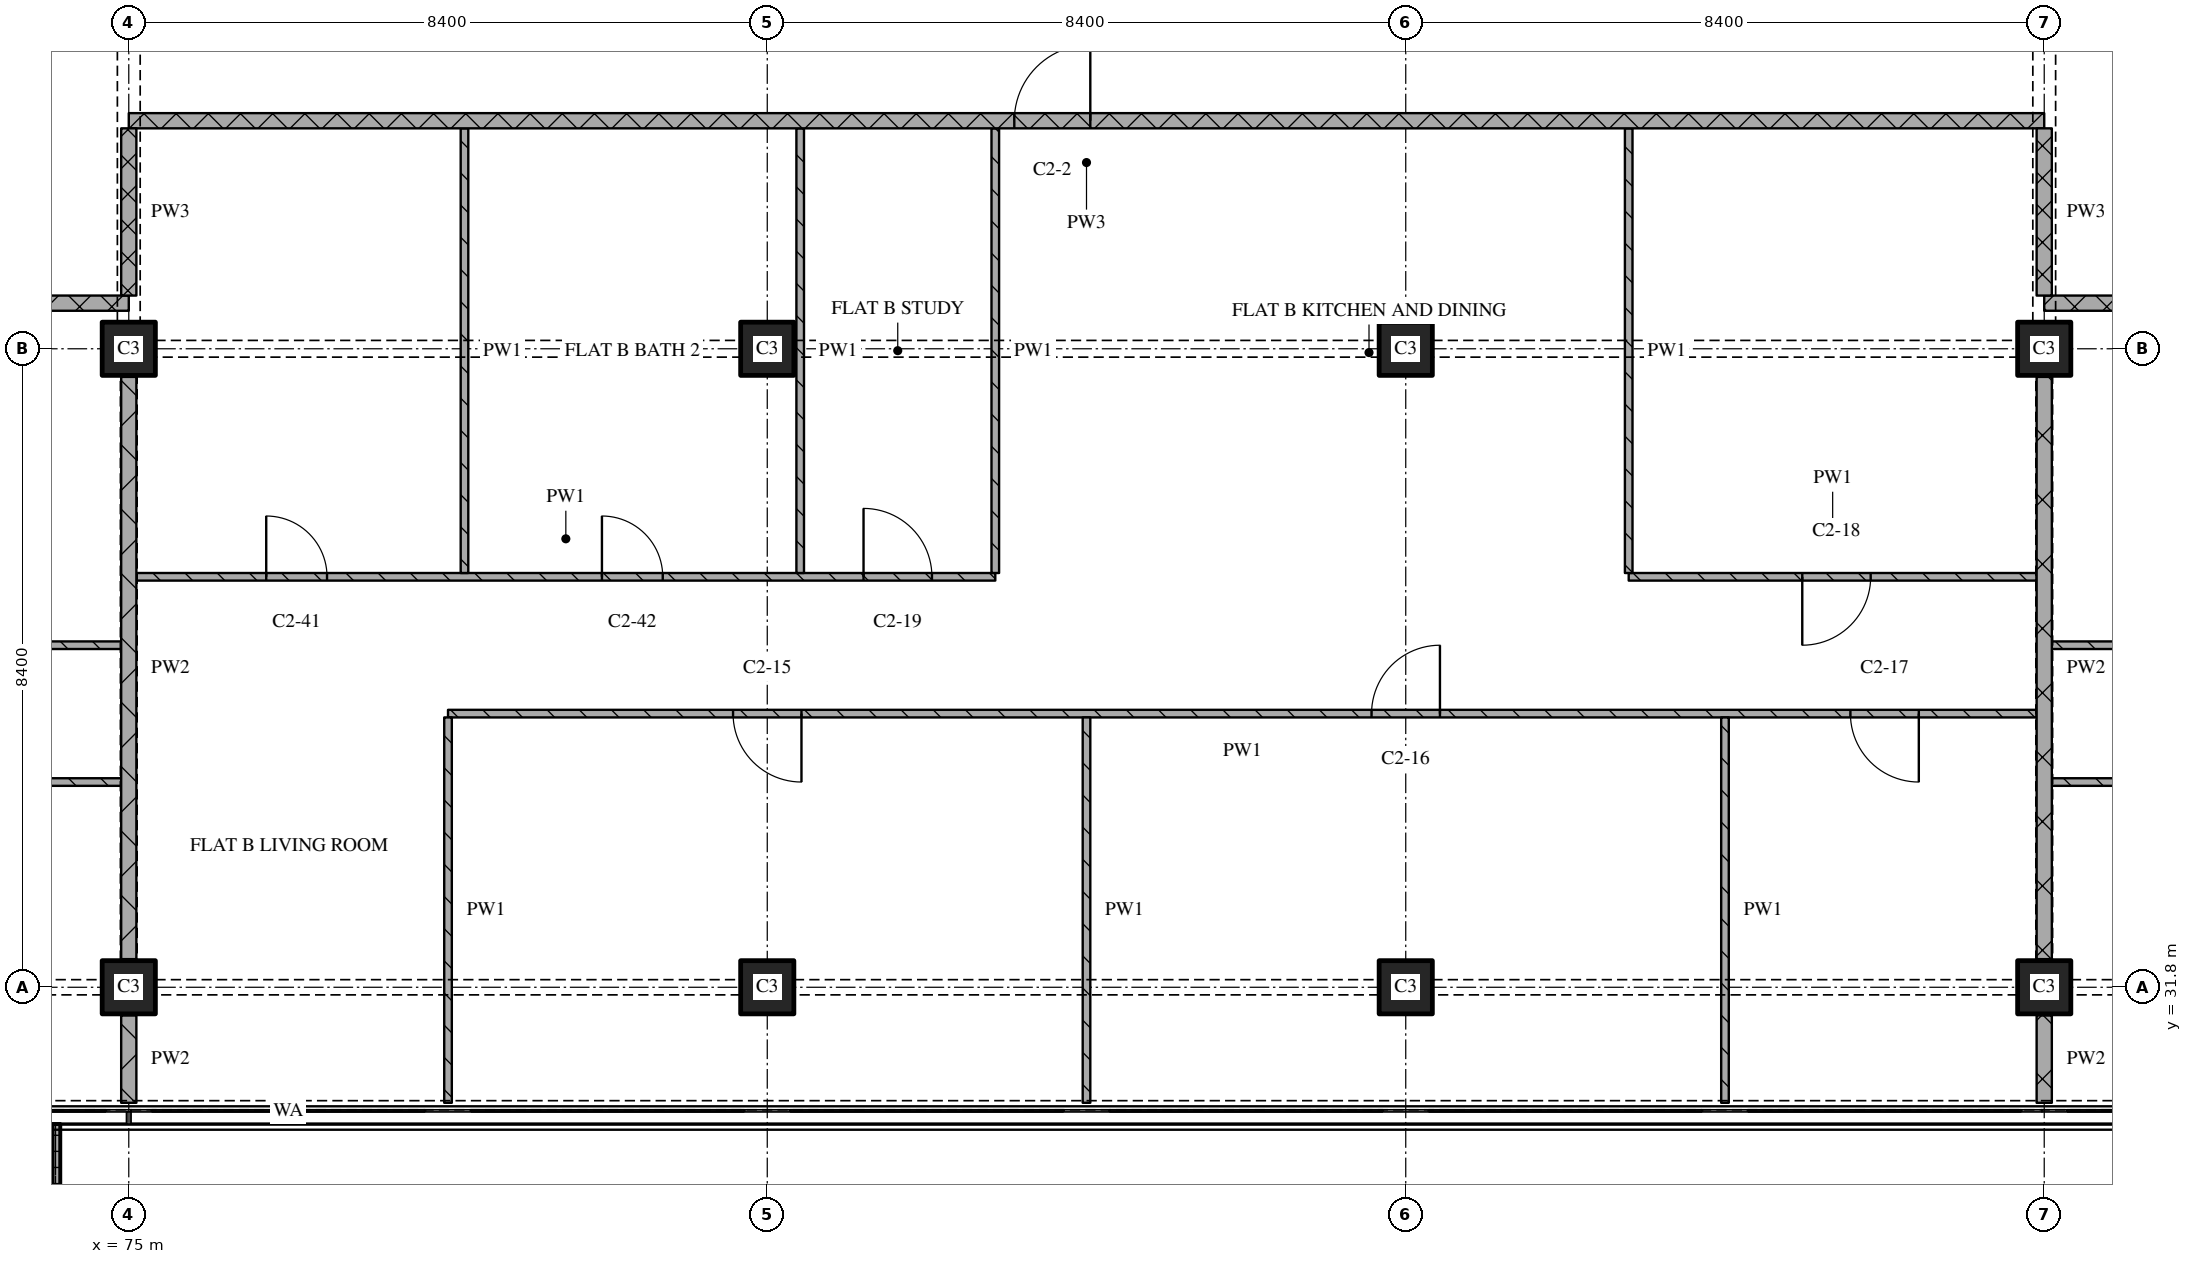
"""IFC4 building model, lengths in metres.
Left out: names, types, materials, properties, quantities, classifications, styles, units other than length and angle.
Written with IfcOpenShell. Run it as: python <this file> out.ifc"""

import sys

from ifc_helpers import new_model, si_unit, direction, frame, frame_2d, origin, origin_2d, place, context, subcontext, project, spatial, polyline, rectangle, outline, extrude, element, fill, save


model = new_model("IFC4")
c1 = context("Model", 3, precision=1e-05, world=origin(), true_north=direction((0.0, 1.0)))
c2 = subcontext(c1, "Body", "Model", "MODEL_VIEW")
j1 = project(units=[si_unit("LENGTHUNIT", "METRE"), si_unit("PLANEANGLEUNIT", "RADIAN")], contexts=[c1])
p1 = place(None, origin())
s1 = spatial("IfcSite", under=j1, at=p1, CompositionType="ELEMENT")
p2 = place(p1, origin())
s2 = spatial("IfcBuilding", under=s1, at=p2, CompositionType="ELEMENT")
p3 = place(p2, frame((0.0, 0.0, 165.45)))
s3 = spatial("IfcBuildingStorey", under=s2, at=p3, CompositionType="ELEMENT", Elevation=165.45)
for number, where, z_axis, x_axis in (
    (1, (75.0, 31.8, 0.0), (0.0, 0.0, 1.0), (1.0, 0.0, 0.0)),
    (2, (75.0, 40.2, 0.0), (0.0, 0.0, 1.0), (1.0, 0.0, 0.0)),
    (3, (83.4, 31.8, 0.0), (0.0, 0.0, 1.0), (1.0, 0.0, 0.0)),
    (4, (83.4, 40.2, 0.0), (0.0, 0.0, 1.0), (1.0, 0.0, 0.0)),
    (5, (91.8, 31.8, 0.0), (0.0, 0.0, 1.0), (1.0, 0.0, 0.0)),
    (6, (91.8, 40.2, 0.0), (0.0, 0.0, 1.0), (1.0, 0.0, 0.0)),
    (7, (100.2, 31.8, 0.0), (0.0, 0.0, 1.0), (1.0, 0.0, 0.0)),
    (8, (100.2, 40.2, 0.0), (0.0, 0.0, 1.0), (1.0, 0.0, 0.0)),
):
    element("IfcColumn", number, at=place(p3, frame(where, z_axis=z_axis, x_axis=x_axis)), inside=s3, PredefinedType="COLUMN", context=c2, shape_type="SweptSolid", body=[
        extrude(rectangle(XDim=0.7, YDim=0.7, at=origin_2d()), origin(), (0.0, 0.0, 1.0), 3.6),
    ])
p4 = place(p3, origin())
e9 = element("IfcWall", 9, at=p4, inside=s3, PredefinedType="SOLIDWALL", context=c2, shape_type="SweptSolid", body=[
    extrude(outline(polyline([(71.7, 30.0), (71.8, 30.0), (71.8, 28.5), (74.0, 28.5), (74.0, 30.0), (74.1, 30.0), (74.1, 28.4), (71.7, 28.4), (71.7, 30.0)])), origin(), (0.0, 0.0, 1.0), 1.0),
])
p5 = place(p3, frame((74.9, 34.5, 0.0), z_axis=(0.0, 0.0, 1.0), x_axis=(-1.0, 0.0, 0.0)))
e10 = element("IfcWall", 10, at=p5, inside=s3, PredefinedType="PARTITIONING", context=c2, shape_type="SweptSolid", body=[
    extrude(rectangle(XDim=16.7, YDim=0.1, at=frame_2d((8.35, 0.0))), origin(), (0.0, 0.0, 1.0), 3.32),
])
p6 = place(p5, frame((1.55, 0.0, 0.0)))
e11 = element("IfcOpeningElement", 11, at=p6, cuts=e10, PredefinedType="OPENING", context=c2, shape_type="SweptSolid", body=[
    extrude(rectangle(XDim=0.9, YDim=2.1, at=frame_2d((0.45, 1.05))), frame((0.0, 0.06, 0.0), z_axis=(0.0, -1.0, 0.0), x_axis=(1.0, 0.0, 0.0)), (0.0, 0.0, 1.0), 0.12),
])
p7 = place(p5, frame((7.85, 0.0, 0.0)))
e12 = element("IfcOpeningElement", 12, at=p7, cuts=e10, PredefinedType="OPENING", context=c2, shape_type="SweptSolid", body=[
    extrude(rectangle(XDim=0.9, YDim=2.1, at=frame_2d((0.45, 1.05))), frame((0.0, 0.06, 0.0), z_axis=(0.0, -1.0, 0.0), x_axis=(1.0, 0.0, 0.0)), (0.0, 0.0, 1.0), 0.12),
])
p8 = place(p5, frame((14.15, 0.0, 0.0)))
e13 = element("IfcOpeningElement", 13, at=p8, cuts=e10, PredefinedType="OPENING", context=c2, shape_type="SweptSolid", body=[
    extrude(rectangle(XDim=0.9, YDim=2.1, at=frame_2d((0.45, 1.05))), frame((0.0, 0.06, 0.0), z_axis=(0.0, -1.0, 0.0), x_axis=(1.0, 0.0, 0.0)), (0.0, 0.0, 1.0), 0.12),
])
p9 = place(p3, frame((117.0, 34.5, 0.0), z_axis=(0.0, 0.0, 1.0), x_axis=(-1.0, 0.0, 0.0)))
e14 = element("IfcWall", 14, at=p9, inside=s3, PredefinedType="PARTITIONING", context=c2, shape_type="SweptSolid", body=[
    extrude(rectangle(XDim=16.7, YDim=0.1, at=frame_2d((8.35, 0.0))), origin(), (0.0, 0.0, 1.0), 3.32),
])
p10 = place(p9, frame((12.15, 0.0, 0.0)))
e15 = element("IfcOpeningElement", 15, at=p10, cuts=e14, PredefinedType="OPENING", context=c2, shape_type="SweptSolid", body=[
    extrude(rectangle(XDim=0.9, YDim=2.1, at=frame_2d((0.45, 1.05))), frame((0.0, 0.06, 0.0), z_axis=(0.0, -1.0, 0.0), x_axis=(1.0, 0.0, 0.0)), (0.0, 0.0, 1.0), 0.12),
])
p11 = place(p3, frame((100.1, 35.4, 0.0), z_axis=(0.0, 0.0, 1.0), x_axis=(-1.0, 0.0, 0.0)))
e16 = element("IfcWall", 16, at=p11, inside=s3, PredefinedType="PARTITIONING", context=c2, shape_type="SweptSolid", body=[
    extrude(rectangle(XDim=20.9, YDim=0.1, at=frame_2d((10.45, 0.0))), origin(), (0.0, 0.0, 1.0), 3.32),
])
p12 = place(p11, frame((1.55, 0.0, 0.0)))
e17 = element("IfcOpeningElement", 17, at=p12, cuts=e16, PredefinedType="OPENING", context=c2, shape_type="SweptSolid", body=[
    extrude(rectangle(XDim=0.9, YDim=2.1, at=frame_2d((0.45, 1.05))), frame((0.0, 0.06, 0.0), z_axis=(0.0, -1.0, 0.0), x_axis=(1.0, 0.0, 0.0)), (0.0, 0.0, 1.0), 0.12),
])
p13 = place(p11, frame((7.85, 0.0, 0.0)))
e18 = element("IfcOpeningElement", 18, at=p13, cuts=e16, PredefinedType="OPENING", context=c2, shape_type="SweptSolid", body=[
    extrude(rectangle(XDim=0.9, YDim=2.1, at=frame_2d((0.45, 1.05))), frame((0.0, 0.06, 0.0), z_axis=(0.0, -1.0, 0.0), x_axis=(1.0, 0.0, 0.0)), (0.0, 0.0, 1.0), 0.12),
])
p14 = place(p11, frame((16.25, 0.0, 0.0)))
e19 = element("IfcOpeningElement", 19, at=p14, cuts=e16, PredefinedType="OPENING", context=c2, shape_type="SweptSolid", body=[
    extrude(rectangle(XDim=0.9, YDim=2.1, at=frame_2d((0.45, 1.05))), frame((0.0, 0.06, 0.0), z_axis=(0.0, -1.0, 0.0), x_axis=(1.0, 0.0, 0.0)), (0.0, 0.0, 1.0), 0.12),
])
p15 = place(p3, frame((66.3, 36.3, 0.0), z_axis=(0.0, 0.0, 1.0), x_axis=(1.0, 0.0, 0.0)))
e20 = element("IfcWall", 20, at=p15, inside=s3, PredefinedType="PARTITIONING", context=c2, shape_type="SweptSolid", body=[
    extrude(rectangle(XDim=8.6, YDim=0.1, at=frame_2d((4.3, 0.0))), origin(), (0.0, 0.0, 1.0), 3.32),
])
p16 = place(p15, frame((6.2, 0.0, 0.0)))
e21 = element("IfcOpeningElement", 21, at=p16, cuts=e20, PredefinedType="OPENING", context=c2, shape_type="SweptSolid", body=[
    extrude(rectangle(XDim=0.8, YDim=2.1, at=frame_2d((0.4, 1.05))), frame((0.0, 0.06, 0.0), z_axis=(0.0, -1.0, 0.0), x_axis=(1.0, 0.0, 0.0)), (0.0, 0.0, 1.0), 0.12),
])
p17 = place(p3, frame((100.3, 36.3, 0.0), z_axis=(0.0, 0.0, 1.0), x_axis=(1.0, 0.0, 0.0)))
e22 = element("IfcWall", 22, at=p17, inside=s3, PredefinedType="PARTITIONING", context=c2, shape_type="SweptSolid", body=[
    extrude(rectangle(XDim=12.2, YDim=0.1, at=frame_2d((6.1, 0.0))), origin(), (0.0, 0.0, 1.0), 3.32),
])
p18 = place(p17, frame((1.75, 0.0, 0.0)))
e23 = element("IfcOpeningElement", 23, at=p18, cuts=e22, PredefinedType="OPENING", context=c2, shape_type="SweptSolid", body=[
    extrude(rectangle(XDim=0.8, YDim=2.1, at=frame_2d((0.4, 1.05))), frame((0.0, 0.06, 0.0), z_axis=(0.0, -1.0, 0.0), x_axis=(1.0, 0.0, 0.0)), (0.0, 0.0, 1.0), 0.12),
])
p19 = place(p17, frame((6.25, 0.0, 0.0)))
e24 = element("IfcOpeningElement", 24, at=p19, cuts=e22, PredefinedType="OPENING", context=c2, shape_type="SweptSolid", body=[
    extrude(rectangle(XDim=0.8, YDim=2.1, at=frame_2d((0.4, 1.05))), frame((0.0, 0.06, 0.0), z_axis=(0.0, -1.0, 0.0), x_axis=(1.0, 0.0, 0.0)), (0.0, 0.0, 1.0), 0.12),
])
p20 = place(p3, frame((75.1, 37.2, 0.0), z_axis=(0.0, 0.0, 1.0), x_axis=(1.0, 0.0, 0.0)))
e25 = element("IfcWall", 25, at=p20, inside=s3, PredefinedType="PARTITIONING", context=c2, shape_type="SweptSolid", body=[
    extrude(rectangle(XDim=11.3, YDim=0.1, at=frame_2d((5.65, 0.0))), origin(), (0.0, 0.0, 1.0), 3.32),
])
p21 = place(p20, frame((1.708, 0.0, 0.0)))
e26 = element("IfcOpeningElement", 26, at=p21, cuts=e25, PredefinedType="OPENING", context=c2, shape_type="SweptSolid", body=[
    extrude(rectangle(XDim=0.8, YDim=2.1, at=frame_2d((0.4, 1.05))), frame((0.0, 0.06, 0.0), z_axis=(0.0, -1.0, 0.0), x_axis=(1.0, 0.0, 0.0)), (0.0, 0.0, 1.0), 0.12),
])
p22 = place(p20, frame((6.125, 0.0, 0.0)))
e27 = element("IfcOpeningElement", 27, at=p22, cuts=e25, PredefinedType="OPENING", context=c2, shape_type="SweptSolid", body=[
    extrude(rectangle(XDim=0.8, YDim=2.1, at=frame_2d((0.4, 1.05))), frame((0.0, 0.06, 0.0), z_axis=(0.0, -1.0, 0.0), x_axis=(1.0, 0.0, 0.0)), (0.0, 0.0, 1.0), 0.12),
])
p23 = place(p20, frame((9.567, 0.0, 0.0)))
e28 = element("IfcOpeningElement", 28, at=p23, cuts=e25, PredefinedType="OPENING", context=c2, shape_type="SweptSolid", body=[
    extrude(rectangle(XDim=0.9, YDim=2.1, at=frame_2d((0.45, 1.05))), frame((0.0, 0.06, 0.0), z_axis=(0.0, -1.0, 0.0), x_axis=(1.0, 0.0, 0.0)), (0.0, 0.0, 1.0), 0.12),
])
p24 = place(p3, frame((94.733, 37.2, 0.0), z_axis=(0.0, 0.0, 1.0), x_axis=(1.0, 0.0, 0.0)))
e29 = element("IfcWall", 29, at=p24, inside=s3, PredefinedType="PARTITIONING", context=c2, shape_type="SweptSolid", body=[
    extrude(rectangle(XDim=5.367, YDim=0.1, at=frame_2d((2.683, 0.0))), origin(), (0.0, 0.0, 1.0), 3.32),
])
p25 = place(p24, frame((2.283, 0.0, 0.0)))
e30 = element("IfcOpeningElement", 30, at=p25, cuts=e29, PredefinedType="OPENING", context=c2, shape_type="SweptSolid", body=[
    extrude(rectangle(XDim=0.9, YDim=2.1, at=frame_2d((0.45, 1.05))), frame((0.0, 0.06, 0.0), z_axis=(0.0, -1.0, 0.0), x_axis=(1.0, 0.0, 0.0)), (0.0, 0.0, 1.0), 0.12),
])
p26 = place(p3, frame((75.0, 40.8, 0.0), z_axis=(0.0, 0.0, 1.0), x_axis=(-1.0, 0.0, 0.0)))
e31 = element("IfcWall", 31, at=p26, inside=s3, PredefinedType="PARTITIONING", context=c2, shape_type="SweptSolid", body=[
    extrude(rectangle(XDim=24.28, YDim=0.2, at=frame_2d((12.14, 0.0))), origin(), (0.0, 0.0, 1.0), 3.32),
])
p27 = place(p26, frame((8.95, 0.0, 0.0)))
e32 = element("IfcOpeningElement", 32, at=p27, cuts=e31, PredefinedType="OPENING", context=c2, shape_type="SweptSolid", body=[
    extrude(rectangle(XDim=1.0, YDim=2.1, at=frame_2d((0.5, 1.05))), frame((0.0, 0.11, 0.0), z_axis=(0.0, -1.0, 0.0), x_axis=(1.0, 0.0, 0.0)), (0.0, 0.0, 1.0), 0.22),
])
p28 = place(p3, frame((124.48, 40.8, 0.0), z_axis=(0.0, 0.0, 1.0), x_axis=(-1.0, 0.0, 0.0)))
e33 = element("IfcWall", 33, at=p28, inside=s3, PredefinedType="PARTITIONING", context=c2, shape_type="SweptSolid", body=[
    extrude(rectangle(XDim=24.28, YDim=0.2, at=frame_2d((12.14, 0.0))), origin(), (0.0, 0.0, 1.0), 3.32),
])
p29 = place(p28, frame((10.73, 0.0, 0.0)))
e34 = element("IfcOpeningElement", 34, at=p29, cuts=e33, PredefinedType="OPENING", context=c2, shape_type="SweptSolid", body=[
    extrude(rectangle(XDim=1.0, YDim=2.1, at=frame_2d((0.5, 1.05))), frame((0.0, 0.11, 0.0), z_axis=(0.0, -1.0, 0.0), x_axis=(1.0, 0.0, 0.0)), (0.0, 0.0, 1.0), 0.22),
])
p30 = place(p3, frame((100.2, 43.2, 0.0), z_axis=(0.0, 0.0, 1.0), x_axis=(-1.0, 0.0, 0.0)))
e35 = element("IfcWall", 35, at=p30, inside=s3, PredefinedType="PARTITIONING", context=c2, shape_type="SweptSolid", body=[
    extrude(rectangle(XDim=25.2, YDim=0.2, at=frame_2d((12.6, 0.0))), origin(), (0.0, 0.0, 1.0), 3.32),
])
p31 = place(p30, frame((12.55, 0.0, 0.0)))
e36 = element("IfcOpeningElement", 36, at=p31, cuts=e35, PredefinedType="OPENING", context=c2, shape_type="SweptSolid", body=[
    extrude(rectangle(XDim=1.0, YDim=2.1, at=frame_2d((0.5, 1.05))), frame((0.0, 0.11, 0.0), z_axis=(0.0, -1.0, 0.0), x_axis=(1.0, 0.0, 0.0)), (0.0, 0.0, 1.0), 0.22),
])
p32 = place(p3, frame((75.0, 43.1, 0.0), z_axis=(0.0, 0.0, 1.0), x_axis=(0.0, -1.0, 0.0)))
e37 = element("IfcWall", 37, at=p32, inside=s3, PredefinedType="PARTITIONING", context=c2, shape_type="SweptSolid", body=[
    extrude(rectangle(XDim=2.2, YDim=0.2, at=frame_2d((1.1, 0.0))), origin(), (0.0, 0.0, 1.0), 2.43),
])
p33 = place(p3, frame((75.0, 31.43, 0.0), z_axis=(0.0, 0.0, 1.0), x_axis=(0.0, -1.0, 0.0)))
e38 = element("IfcWall", 38, at=p33, inside=s3, PredefinedType="PARTITIONING", context=c2, shape_type="SweptSolid", body=[
    extrude(rectangle(XDim=1.15, YDim=0.2, at=frame_2d((0.575, 0.0))), origin(), (0.0, 0.0, 1.0), 3.32),
])
p34 = place(p3, frame((75.0, 39.83, 0.0), z_axis=(0.0, 0.0, 1.0), x_axis=(0.0, -1.0, 0.0)))
e39 = element("IfcWall", 39, at=p34, inside=s3, PredefinedType="PARTITIONING", context=c2, shape_type="SweptSolid", body=[
    extrude(rectangle(XDim=7.66, YDim=0.2, at=frame_2d((3.83, 0.0))), origin(), (0.0, 0.0, 1.0), 2.72),
])
p35 = place(p3, frame((79.2, 35.35, 0.0), z_axis=(0.0, 0.0, 1.0), x_axis=(0.0, -1.0, 0.0)))
e40 = element("IfcWall", 40, at=p35, inside=s3, PredefinedType="PARTITIONING", context=c2, shape_type="SweptSolid", body=[
    extrude(rectangle(XDim=5.07, YDim=0.1, at=frame_2d((2.535, 0.0))), origin(), (0.0, 0.0, 1.0), 3.32),
])
for number, where, z_axis, x_axis in (
    (41, (79.417, 43.1, 0.0), (0.0, 0.0, 1.0), (0.0, -1.0, 0.0)),
    (42, (83.833, 43.1, 0.0), (0.0, 0.0, 1.0), (0.0, -1.0, 0.0)),
    (43, (86.4, 43.1, 0.0), (0.0, 0.0, 1.0), (0.0, -1.0, 0.0)),
):
    element("IfcWall", number, at=place(p3, frame(where, z_axis=z_axis, x_axis=x_axis)), inside=s3, PredefinedType="PARTITIONING", context=c2, shape_type="SweptSolid", body=[
        extrude(rectangle(XDim=5.85, YDim=0.1, at=frame_2d((2.925, 0.0))), origin(), (0.0, 0.0, 1.0), 3.32),
    ])
p36 = place(p3, frame((87.6, 35.35, 0.0), z_axis=(0.0, 0.0, 1.0), x_axis=(0.0, -1.0, 0.0)))
e44 = element("IfcWall", 44, at=p36, inside=s3, PredefinedType="PARTITIONING", context=c2, shape_type="SweptSolid", body=[
    extrude(rectangle(XDim=5.07, YDim=0.1, at=frame_2d((2.535, 0.0))), origin(), (0.0, 0.0, 1.0), 3.32),
])
p37 = place(p3, frame((94.733, 43.1, 0.0), z_axis=(0.0, 0.0, 1.0), x_axis=(0.0, -1.0, 0.0)))
e45 = element("IfcWall", 45, at=p37, inside=s3, PredefinedType="PARTITIONING", context=c2, shape_type="SweptSolid", body=[
    extrude(rectangle(XDim=5.85, YDim=0.1, at=frame_2d((2.925, 0.0))), origin(), (0.0, 0.0, 1.0), 3.32),
])
p38 = place(p3, frame((96.0, 35.35, 0.0), z_axis=(0.0, 0.0, 1.0), x_axis=(0.0, -1.0, 0.0)))
e46 = element("IfcWall", 46, at=p38, inside=s3, PredefinedType="PARTITIONING", context=c2, shape_type="SweptSolid", body=[
    extrude(rectangle(XDim=5.07, YDim=0.1, at=frame_2d((2.535, 0.0))), origin(), (0.0, 0.0, 1.0), 3.32),
])
p39 = place(p3, frame((100.2, 43.1, 0.0), z_axis=(0.0, 0.0, 1.0), x_axis=(0.0, -1.0, 0.0)))
e47 = element("IfcWall", 47, at=p39, inside=s3, PredefinedType="PARTITIONING", context=c2, shape_type="SweptSolid", body=[
    extrude(rectangle(XDim=2.2, YDim=0.2, at=frame_2d((1.1, 0.0))), origin(), (0.0, 0.0, 1.0), 2.43),
])
p40 = place(p3, frame((100.2, 31.43, 0.0), z_axis=(0.0, 0.0, 1.0), x_axis=(0.0, -1.0, 0.0)))
e48 = element("IfcWall", 48, at=p40, inside=s3, PredefinedType="PARTITIONING", context=c2, shape_type="SweptSolid", body=[
    extrude(rectangle(XDim=1.15, YDim=0.2, at=frame_2d((0.575, 0.0))), origin(), (0.0, 0.0, 1.0), 3.32),
])
p41 = place(p3, frame((100.2, 39.83, 0.0), z_axis=(0.0, 0.0, 1.0), x_axis=(0.0, -1.0, 0.0)))
e49 = element("IfcWall", 49, at=p41, inside=s3, PredefinedType="PARTITIONING", context=c2, shape_type="SweptSolid", body=[
    extrude(rectangle(XDim=7.66, YDim=0.2, at=frame_2d((3.83, 0.0))), origin(), (0.0, 0.0, 1.0), 2.72),
])
p42 = place(p12, origin())
e50 = element("IfcDoor", 50, at=p42, inside=s3, OperationType="SINGLE_SWING_LEFT", PredefinedType="DOOR", context=c2, shape_type="SweptSolid", body=[
    extrude(rectangle(XDim=0.9, YDim=2.1, at=frame_2d((0.45, 1.05))), frame((0.0, 0.025, 0.0), z_axis=(0.0, -1.0, 0.0), x_axis=(1.0, 0.0, 0.0)), (0.0, 0.0, 1.0), 0.05),
])
fill(e17, e50)
p43 = place(p13, origin())
e51 = element("IfcDoor", 51, at=p43, inside=s3, OperationType="SINGLE_SWING_RIGHT", PredefinedType="DOOR", context=c2, shape_type="SweptSolid", body=[
    extrude(rectangle(XDim=0.9, YDim=2.1, at=frame_2d((0.45, 1.05))), frame((0.0, 0.025, 0.0), z_axis=(0.0, -1.0, 0.0), x_axis=(1.0, 0.0, 0.0)), (0.0, 0.0, 1.0), 0.05),
])
fill(e18, e51)
p44 = place(p14, origin())
e52 = element("IfcDoor", 52, at=p44, inside=s3, OperationType="SINGLE_SWING_LEFT", PredefinedType="DOOR", context=c2, shape_type="SweptSolid", body=[
    extrude(rectangle(XDim=0.9, YDim=2.1, at=frame_2d((0.45, 1.05))), frame((0.0, 0.025, 0.0), z_axis=(0.0, -1.0, 0.0), x_axis=(1.0, 0.0, 0.0)), (0.0, 0.0, 1.0), 0.05),
])
fill(e19, e52)
p45 = place(p21, origin())
e53 = element("IfcDoor", 53, at=p45, inside=s3, OperationType="SINGLE_SWING_LEFT", PredefinedType="DOOR", context=c2, shape_type="SweptSolid", body=[
    extrude(rectangle(XDim=0.8, YDim=2.1, at=frame_2d((0.4, 1.05))), frame((0.0, 0.025, 0.0), z_axis=(0.0, -1.0, 0.0), x_axis=(1.0, 0.0, 0.0)), (0.0, 0.0, 1.0), 0.05),
])
fill(e26, e53)
p46 = place(p22, origin())
e54 = element("IfcDoor", 54, at=p46, inside=s3, OperationType="SINGLE_SWING_LEFT", PredefinedType="DOOR", context=c2, shape_type="SweptSolid", body=[
    extrude(rectangle(XDim=0.8, YDim=2.1, at=frame_2d((0.4, 1.05))), frame((0.0, 0.025, 0.0), z_axis=(0.0, -1.0, 0.0), x_axis=(1.0, 0.0, 0.0)), (0.0, 0.0, 1.0), 0.05),
])
fill(e27, e54)
p47 = place(p23, origin())
e55 = element("IfcDoor", 55, at=p47, inside=s3, OperationType="SINGLE_SWING_LEFT", PredefinedType="DOOR", context=c2, shape_type="SweptSolid", body=[
    extrude(rectangle(XDim=0.9, YDim=2.1, at=frame_2d((0.45, 1.05))), frame((0.0, 0.025, 0.0), z_axis=(0.0, -1.0, 0.0), x_axis=(1.0, 0.0, 0.0)), (0.0, 0.0, 1.0), 0.05),
])
fill(e28, e55)
p48 = place(p25, origin())
e56 = element("IfcDoor", 56, at=p48, inside=s3, OperationType="SINGLE_SWING_RIGHT", PredefinedType="DOOR", context=c2, shape_type="SweptSolid", body=[
    extrude(rectangle(XDim=0.9, YDim=2.1, at=frame_2d((0.45, 1.05))), frame((0.0, 0.025, 0.0), z_axis=(0.0, -1.0, 0.0), x_axis=(1.0, 0.0, 0.0)), (0.0, 0.0, 1.0), 0.05),
])
fill(e30, e56)
p49 = place(p31, origin())
e57 = element("IfcDoor", 57, at=p49, inside=s3, OperationType="SINGLE_SWING_RIGHT", PredefinedType="DOOR", context=c2, shape_type="SweptSolid", body=[
    extrude(rectangle(XDim=1.0, YDim=2.1, at=frame_2d((0.5, 1.05))), frame((0.0, 0.025, 0.0), z_axis=(0.0, -1.0, 0.0), x_axis=(1.0, 0.0, 0.0)), (0.0, 0.0, 1.0), 0.05),
])
fill(e36, e57)
save(model, sys.argv[1])
